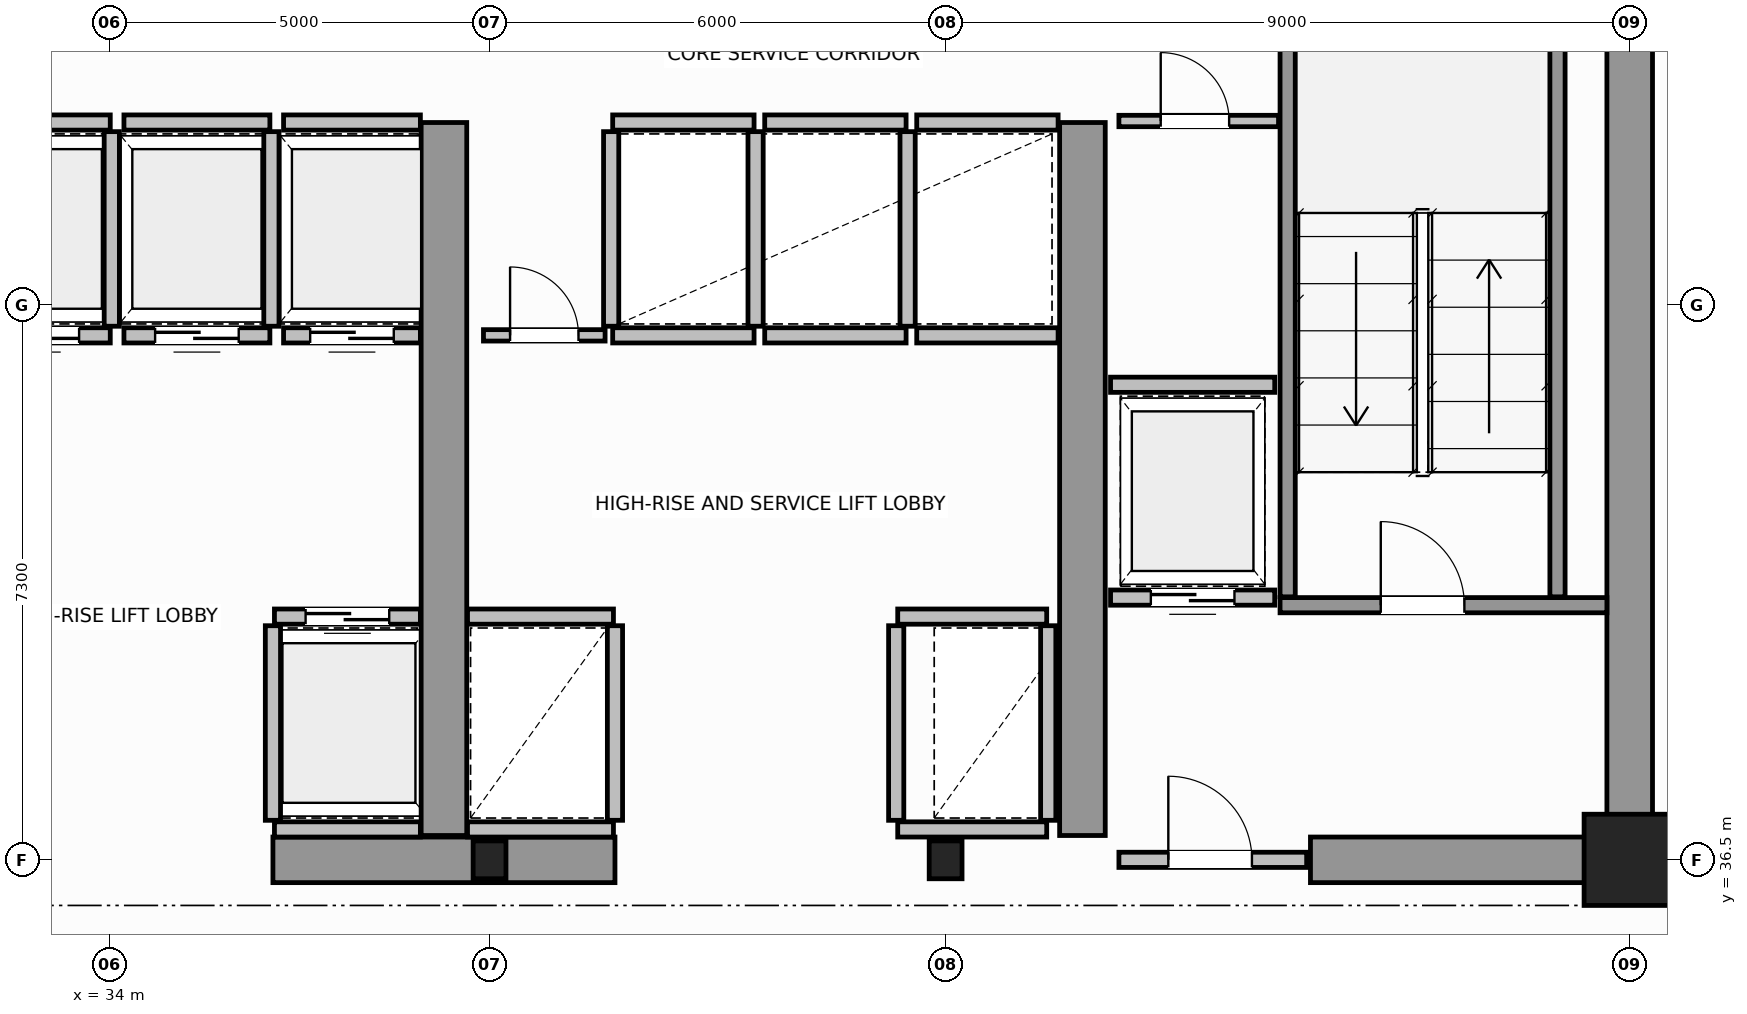
"""IFC4 building model, lengths in metres.
Left out: names, types, materials, properties, quantities, classifications, styles, units other than length and angle.
Written with IfcOpenShell. Run it as: python <this file> out.ifc"""

import sys

from ifc_helpers import new_model, si_unit, direction, frame, frame_2d, origin, origin_2d, place, context, subcontext, project, spatial, rectangle, i_section, extrude, source, transform, mapped, element, fill, save


model = new_model("IFC4")
c1 = context("Model", 3, precision=1e-05, world=origin(), true_north=direction((0.0, 1.0)))
c2 = subcontext(c1, "Body", "Model", "MODEL_VIEW")
j1 = project(units=[si_unit("LENGTHUNIT", "METRE"), si_unit("PLANEANGLEUNIT", "RADIAN")], contexts=[c1])
p1 = place(None, origin())
s1 = spatial("IfcSite", under=j1, at=p1, CompositionType="ELEMENT")
p2 = place(p1, origin())
s2 = spatial("IfcBuilding", under=s1, at=p2, CompositionType="ELEMENT")
p3 = place(p2, frame((0.0, 0.0, 188.0)))
s3 = spatial("IfcBuildingStorey", under=s2, at=p3, CompositionType="ELEMENT", Elevation=188.0)
m1 = source(origin(), c2, "Body", "SweptSolid", [
    extrude(i_section(OverallWidth=0.432, OverallDepth=0.498, WebThickness=0.055, FlangeThickness=0.068, FilletRadius=0.015, at=origin_2d()), origin(), (0.0, 0.0, 1.0), 3.8),
])
for number, where, z_axis, x_axis in (
    (1, (39.0, 36.5, 0.0), (0.0, 0.0, 1.0), (1.0, 0.0, 0.0)),
    (2, (45.0, 36.5, 0.0), (0.0, 0.0, 1.0), (1.0, 0.0, 0.0)),
):
    element("IfcColumn", number, at=place(p3, frame(where, z_axis=z_axis, x_axis=x_axis)), inside=s3, PredefinedType="COLUMN", context=c2, shape_type="MappedRepresentation", body=[
        mapped(m1, transform((0.0, 0.0, 0.0), scale=1.0)),
    ])
m2 = source(origin(), c2, "Body", "SweptSolid", [
    extrude(rectangle(XDim=1.2, YDim=1.2, at=origin_2d()), origin(), (0.0, 0.0, 1.0), 3.8),
])
p4 = place(p3, frame((54.0, 36.5, 0.0), z_axis=(0.0, 0.0, 1.0), x_axis=(1.0, 0.0, 0.0)))
e3 = element("IfcColumn", 3, at=p4, inside=s3, PredefinedType="COLUMN", context=c2, shape_type="MappedRepresentation", body=[
    mapped(m2, transform((0.0, 0.0, 0.0), scale=1.0)),
])
p5 = place(p3, frame((54.0, 36.5, 0.0), z_axis=(0.0, 0.0, 1.0), x_axis=(0.0, 1.0, 0.0)))
e4 = element("IfcWall", 4, at=p5, inside=s3, PredefinedType="SHEAR", context=c2, shape_type="SweptSolid", body=[
    extrude(rectangle(XDim=14.5, YDim=0.6, at=frame_2d((7.25, 0.0))), origin(), (0.0, 0.0, 1.0), 3.8),
])
p6 = place(p3, frame((36.15, 36.5, 0.0), z_axis=(0.0, 0.0, 1.0), x_axis=(1.0, 0.0, 0.0)))
e5 = element("IfcWall", 5, at=p6, inside=s3, PredefinedType="SHEAR", context=c2, shape_type="SweptSolid", body=[
    extrude(rectangle(XDim=4.5, YDim=0.6, at=frame_2d((2.25, 0.0))), origin(), (0.0, 0.0, 1.0), 3.8),
])
p7 = place(p3, frame((49.8, 36.5, 0.0), z_axis=(0.0, 0.0, 1.0), x_axis=(1.0, 0.0, 0.0)))
e6 = element("IfcWall", 6, at=p7, inside=s3, PredefinedType="SHEAR", context=c2, shape_type="SweptSolid", body=[
    extrude(rectangle(XDim=3.88, YDim=0.6, at=frame_2d((1.94, 0.0))), origin(), (0.0, 0.0, 1.0), 2.58),
])
for number, where, z_axis, x_axis in (
    (7, (38.4, 36.82, 0.0), (0.0, 0.0, 1.0), (0.0, 1.0, 0.0)),
    (8, (46.8, 36.82, 0.0), (0.0, 0.0, 1.0), (0.0, 1.0, 0.0)),
):
    element("IfcWall", number, at=place(p3, frame(where, z_axis=z_axis, x_axis=x_axis)), inside=s3, PredefinedType="SHEAR", context=c2, shape_type="SweptSolid", body=[
        extrude(rectangle(XDim=9.38, YDim=0.6, at=frame_2d((4.69, 0.0))), origin(), (0.0, 0.0, 1.0), 3.8),
    ])
p8 = place(p3, frame((49.4, 39.85, 0.0), z_axis=(0.0, 0.0, 1.0), x_axis=(1.0, 0.0, 0.0)))
e9 = element("IfcWall", 9, at=p8, inside=s3, PredefinedType="SOLIDWALL", context=c2, shape_type="SweptSolid", body=[
    extrude(rectangle(XDim=4.3, YDim=0.2, at=frame_2d((2.15, 0.0))), origin(), (0.0, 0.0, 1.0), 3.8),
])
p9 = place(p8, frame((1.325, 0.0, 0.0)))
e10 = element("IfcOpeningElement", 10, at=p9, cuts=e9, PredefinedType="OPENING", context=c2, shape_type="SweptSolid", body=[
    extrude(rectangle(XDim=1.1, YDim=2.15, at=frame_2d((0.55, 1.075))), frame((0.0, 0.11, 0.0), z_axis=(0.0, -1.0, 0.0), x_axis=(1.0, 0.0, 0.0)), (0.0, 0.0, 1.0), 0.22),
])
for number, where, z_axis, x_axis in (
    (11, (49.5, 39.96, 0.0), (0.0, 0.0, 1.0), (0.0, 1.0, 0.0)),
    (12, (53.05, 39.96, 0.0), (0.0, 0.0, 1.0), (0.0, 1.0, 0.0)),
):
    element("IfcWall", number, at=place(p3, frame(where, z_axis=z_axis, x_axis=x_axis)), inside=s3, PredefinedType="SOLIDWALL", context=c2, shape_type="SweptSolid", body=[
        extrude(rectangle(XDim=9.93, YDim=0.2, at=frame_2d((4.965, 0.0))), origin(), (0.0, 0.0, 1.0), 3.8),
    ])
p10 = place(p3, frame((47.28, 36.5, 0.0), z_axis=(0.0, 0.0, 1.0), x_axis=(1.0, 0.0, 0.0)))
e13 = element("IfcWall", 13, at=p10, inside=s3, PredefinedType="SOLIDWALL", context=c2, shape_type="SweptSolid", body=[
    extrude(rectangle(XDim=2.47, YDim=0.2, at=frame_2d((1.235, 0.0))), origin(), (0.0, 0.0, 1.0), 2.57),
])
p11 = place(p10, frame((0.65, 0.0, 0.0)))
e14 = element("IfcOpeningElement", 14, at=p11, cuts=e13, PredefinedType="OPENING", context=c2, shape_type="SweptSolid", body=[
    extrude(rectangle(XDim=1.1, YDim=2.15, at=frame_2d((0.55, 1.075))), frame((0.0, 0.11, 0.0), z_axis=(0.0, -1.0, 0.0), x_axis=(1.0, 0.0, 0.0)), (0.0, 0.0, 1.0), 0.22),
])
p12 = place(p3, frame((36.17, 39.7, 0.0), z_axis=(0.0, 0.0, 1.0), x_axis=(1.0, 0.0, 0.0)))
e15 = element("IfcWall", 15, at=p12, inside=s3, PredefinedType="SOLIDWALL", context=c2, shape_type="SweptSolid", body=[
    extrude(rectangle(XDim=1.92, YDim=0.2, at=frame_2d((0.96, 0.0))), origin(), (0.0, 0.0, 1.0), 3.58),
])
p13 = place(p12, frame((0.41, 0.0, 0.0)))
e16 = element("IfcOpeningElement", 16, at=p13, cuts=e15, PredefinedType="OPENING", context=c2, shape_type="SweptSolid", body=[
    extrude(rectangle(XDim=1.1, YDim=2.15, at=frame_2d((0.55, 1.075))), frame((0.0, 0.11, 0.0), z_axis=(0.0, -1.0, 0.0), x_axis=(1.0, 0.0, 0.0)), (0.0, 0.0, 1.0), 0.22),
])
p14 = place(p3, frame((36.17, 36.9, 0.0), z_axis=(0.0, 0.0, 1.0), x_axis=(1.0, 0.0, 0.0)))
e17 = element("IfcWall", 17, at=p14, inside=s3, PredefinedType="SOLIDWALL", context=c2, shape_type="SweptSolid", body=[
    extrude(rectangle(XDim=1.92, YDim=0.2, at=frame_2d((0.96, 0.0))), origin(), (0.0, 0.0, 1.0), 3.58),
])
p15 = place(p3, frame((36.15, 37.02, 0.0), z_axis=(0.0, 0.0, 1.0), x_axis=(0.0, 1.0, 0.0)))
e18 = element("IfcWall", 18, at=p15, inside=s3, PredefinedType="SOLIDWALL", context=c2, shape_type="SweptSolid", body=[
    extrude(rectangle(XDim=2.56, YDim=0.2, at=frame_2d((1.28, 0.0))), origin(), (0.0, 0.0, 1.0), 3.58),
])
p16 = place(p3, frame((32.09, 43.4, 0.0), z_axis=(0.0, 0.0, 1.0), x_axis=(1.0, 0.0, 0.0)))
e19 = element("IfcWall", 19, at=p16, inside=s3, PredefinedType="SOLIDWALL", context=c2, shape_type="SweptSolid", body=[
    extrude(rectangle(XDim=1.92, YDim=0.2, at=frame_2d((0.96, 0.0))), origin(), (0.0, 0.0, 1.0), 3.58),
])
p17 = place(p16, frame((0.41, 0.0, 0.0)))
e20 = element("IfcOpeningElement", 20, at=p17, cuts=e19, PredefinedType="OPENING", context=c2, shape_type="SweptSolid", body=[
    extrude(rectangle(XDim=1.1, YDim=2.15, at=frame_2d((0.55, 1.075))), frame((0.0, 0.11, 0.0), z_axis=(0.0, -1.0, 0.0), x_axis=(1.0, 0.0, 0.0)), (0.0, 0.0, 1.0), 0.22),
])
p18 = place(p3, frame((32.09, 46.2, 0.0), z_axis=(0.0, 0.0, 1.0), x_axis=(1.0, 0.0, 0.0)))
e21 = element("IfcWall", 21, at=p18, inside=s3, PredefinedType="SOLIDWALL", context=c2, shape_type="SweptSolid", body=[
    extrude(rectangle(XDim=1.92, YDim=0.2, at=frame_2d((0.96, 0.0))), origin(), (0.0, 0.0, 1.0), 3.58),
])
p19 = place(p3, frame((34.03, 43.52, 0.0), z_axis=(0.0, 0.0, 1.0), x_axis=(0.0, 1.0, 0.0)))
e22 = element("IfcWall", 22, at=p19, inside=s3, PredefinedType="SOLIDWALL", context=c2, shape_type="SweptSolid", body=[
    extrude(rectangle(XDim=2.56, YDim=0.2, at=frame_2d((1.28, 0.0))), origin(), (0.0, 0.0, 1.0), 3.58),
])
p20 = place(p3, frame((34.19, 43.4, 0.0), z_axis=(0.0, 0.0, 1.0), x_axis=(1.0, 0.0, 0.0)))
e23 = element("IfcWall", 23, at=p20, inside=s3, PredefinedType="SOLIDWALL", context=c2, shape_type="SweptSolid", body=[
    extrude(rectangle(XDim=1.92, YDim=0.2, at=frame_2d((0.96, 0.0))), origin(), (0.0, 0.0, 1.0), 3.58),
])
p21 = place(p20, frame((0.41, 0.0, 0.0)))
e24 = element("IfcOpeningElement", 24, at=p21, cuts=e23, PredefinedType="OPENING", context=c2, shape_type="SweptSolid", body=[
    extrude(rectangle(XDim=1.1, YDim=2.15, at=frame_2d((0.55, 1.075))), frame((0.0, 0.11, 0.0), z_axis=(0.0, -1.0, 0.0), x_axis=(1.0, 0.0, 0.0)), (0.0, 0.0, 1.0), 0.22),
])
p22 = place(p3, frame((34.19, 46.2, 0.0), z_axis=(0.0, 0.0, 1.0), x_axis=(1.0, 0.0, 0.0)))
e25 = element("IfcWall", 25, at=p22, inside=s3, PredefinedType="SOLIDWALL", context=c2, shape_type="SweptSolid", body=[
    extrude(rectangle(XDim=1.92, YDim=0.2, at=frame_2d((0.96, 0.0))), origin(), (0.0, 0.0, 1.0), 3.58),
])
p23 = place(p3, frame((36.13, 43.52, 0.0), z_axis=(0.0, 0.0, 1.0), x_axis=(0.0, 1.0, 0.0)))
e26 = element("IfcWall", 26, at=p23, inside=s3, PredefinedType="SOLIDWALL", context=c2, shape_type="SweptSolid", body=[
    extrude(rectangle(XDim=2.56, YDim=0.2, at=frame_2d((1.28, 0.0))), origin(), (0.0, 0.0, 1.0), 3.58),
])
p24 = place(p3, frame((36.29, 43.4, 0.0), z_axis=(0.0, 0.0, 1.0), x_axis=(1.0, 0.0, 0.0)))
e27 = element("IfcWall", 27, at=p24, inside=s3, PredefinedType="SOLIDWALL", context=c2, shape_type="SweptSolid", body=[
    extrude(rectangle(XDim=1.8, YDim=0.2, at=frame_2d((0.9, 0.0))), origin(), (0.0, 0.0, 1.0), 3.58),
])
p25 = place(p24, frame((0.35, 0.0, 0.0)))
e28 = element("IfcOpeningElement", 28, at=p25, cuts=e27, PredefinedType="OPENING", context=c2, shape_type="SweptSolid", body=[
    extrude(rectangle(XDim=1.1, YDim=2.15, at=frame_2d((0.55, 1.075))), frame((0.0, 0.11, 0.0), z_axis=(0.0, -1.0, 0.0), x_axis=(1.0, 0.0, 0.0)), (0.0, 0.0, 1.0), 0.22),
])
p26 = place(p3, frame((36.29, 46.2, 0.0), z_axis=(0.0, 0.0, 1.0), x_axis=(1.0, 0.0, 0.0)))
e29 = element("IfcWall", 29, at=p26, inside=s3, PredefinedType="SOLIDWALL", context=c2, shape_type="SweptSolid", body=[
    extrude(rectangle(XDim=1.8, YDim=0.2, at=frame_2d((0.9, 0.0))), origin(), (0.0, 0.0, 1.0), 3.58),
])
for number, where, z_axis, x_axis in (
    (30, (38.71, 39.7, 0.0), (0.0, 0.0, 1.0), (1.0, 0.0, 0.0)),
    (31, (38.71, 36.9, 0.0), (0.0, 0.0, 1.0), (1.0, 0.0, 0.0)),
):
    element("IfcWall", number, at=place(p3, frame(where, z_axis=z_axis, x_axis=x_axis)), inside=s3, PredefinedType="SOLIDWALL", context=c2, shape_type="SweptSolid", body=[
        extrude(rectangle(XDim=1.92, YDim=0.2, at=frame_2d((0.96, 0.0))), origin(), (0.0, 0.0, 1.0), 3.58),
    ])
p27 = place(p3, frame((40.65, 37.02, 0.0), z_axis=(0.0, 0.0, 1.0), x_axis=(0.0, 1.0, 0.0)))
e32 = element("IfcWall", 32, at=p27, inside=s3, PredefinedType="SOLIDWALL", context=c2, shape_type="SweptSolid", body=[
    extrude(rectangle(XDim=2.56, YDim=0.2, at=frame_2d((1.28, 0.0))), origin(), (0.0, 0.0, 1.0), 3.58),
])
p28 = place(p3, frame((44.37, 39.7, 0.0), z_axis=(0.0, 0.0, 1.0), x_axis=(1.0, 0.0, 0.0)))
e33 = element("IfcWall", 33, at=p28, inside=s3, PredefinedType="SOLIDWALL", context=c2, shape_type="SweptSolid", body=[
    extrude(rectangle(XDim=1.96, YDim=0.2, at=frame_2d((0.98, 0.0))), origin(), (0.0, 0.0, 1.0), 3.58),
])
p29 = place(p3, frame((44.37, 36.9, 0.0), z_axis=(0.0, 0.0, 1.0), x_axis=(1.0, 0.0, 0.0)))
e34 = element("IfcWall", 34, at=p29, inside=s3, PredefinedType="SOLIDWALL", context=c2, shape_type="SweptSolid", body=[
    extrude(rectangle(XDim=1.96, YDim=0.2, at=frame_2d((0.98, 0.0))), origin(), (0.0, 0.0, 1.0), 2.57),
])
for number, where, z_axis, x_axis in (
    (35, (44.35, 37.02, 0.0), (0.0, 0.0, 1.0), (0.0, 1.0, 0.0)),
    (36, (46.35, 37.02, 0.0), (0.0, 0.0, 1.0), (0.0, 1.0, 0.0)),
):
    element("IfcWall", number, at=place(p3, frame(where, z_axis=z_axis, x_axis=x_axis)), inside=s3, PredefinedType="SOLIDWALL", context=c2, shape_type="SweptSolid", body=[
        extrude(rectangle(XDim=2.56, YDim=0.2, at=frame_2d((1.28, 0.0))), origin(), (0.0, 0.0, 1.0), 3.58),
    ])
for number, where, z_axis, x_axis in (
    (37, (40.62, 43.4, 0.0), (0.0, 0.0, 1.0), (1.0, 0.0, 0.0)),
    (38, (40.62, 46.2, 0.0), (0.0, 0.0, 1.0), (1.0, 0.0, 0.0)),
):
    element("IfcWall", number, at=place(p3, frame(where, z_axis=z_axis, x_axis=x_axis)), inside=s3, PredefinedType="SOLIDWALL", context=c2, shape_type="SweptSolid", body=[
        extrude(rectangle(XDim=1.86, YDim=0.2, at=frame_2d((0.93, 0.0))), origin(), (0.0, 0.0, 1.0), 3.58),
    ])
for number, where, z_axis, x_axis in (
    (39, (40.6, 43.52, 0.0), (0.0, 0.0, 1.0), (0.0, 1.0, 0.0)),
    (40, (42.5, 43.52, 0.0), (0.0, 0.0, 1.0), (0.0, 1.0, 0.0)),
):
    element("IfcWall", number, at=place(p3, frame(where, z_axis=z_axis, x_axis=x_axis)), inside=s3, PredefinedType="SOLIDWALL", context=c2, shape_type="SweptSolid", body=[
        extrude(rectangle(XDim=2.56, YDim=0.2, at=frame_2d((1.28, 0.0))), origin(), (0.0, 0.0, 1.0), 3.58),
    ])
for number, where, z_axis, x_axis in (
    (41, (42.62, 43.4, 0.0), (0.0, 0.0, 1.0), (1.0, 0.0, 0.0)),
    (42, (42.62, 46.2, 0.0), (0.0, 0.0, 1.0), (1.0, 0.0, 0.0)),
):
    element("IfcWall", number, at=place(p3, frame(where, z_axis=z_axis, x_axis=x_axis)), inside=s3, PredefinedType="SOLIDWALL", context=c2, shape_type="SweptSolid", body=[
        extrude(rectangle(XDim=1.86, YDim=0.2, at=frame_2d((0.93, 0.0))), origin(), (0.0, 0.0, 1.0), 3.58),
    ])
p30 = place(p3, frame((44.5, 43.52, 0.0), z_axis=(0.0, 0.0, 1.0), x_axis=(0.0, 1.0, 0.0)))
e43 = element("IfcWall", 43, at=p30, inside=s3, PredefinedType="SOLIDWALL", context=c2, shape_type="SweptSolid", body=[
    extrude(rectangle(XDim=2.56, YDim=0.2, at=frame_2d((1.28, 0.0))), origin(), (0.0, 0.0, 1.0), 3.58),
])
for number, where, z_axis, x_axis in (
    (44, (44.62, 43.4, 0.0), (0.0, 0.0, 1.0), (1.0, 0.0, 0.0)),
    (45, (44.62, 46.2, 0.0), (0.0, 0.0, 1.0), (1.0, 0.0, 0.0)),
):
    element("IfcWall", number, at=place(p3, frame(where, z_axis=z_axis, x_axis=x_axis)), inside=s3, PredefinedType="SOLIDWALL", context=c2, shape_type="SweptSolid", body=[
        extrude(rectangle(XDim=1.86, YDim=0.2, at=frame_2d((0.93, 0.0))), origin(), (0.0, 0.0, 1.0), 3.58),
    ])
p31 = place(p3, frame((47.17, 39.95, 0.0), z_axis=(0.0, 0.0, 1.0), x_axis=(1.0, 0.0, 0.0)))
e46 = element("IfcWall", 46, at=p31, inside=s3, PredefinedType="SOLIDWALL", context=c2, shape_type="SweptSolid", body=[
    extrude(rectangle(XDim=2.16, YDim=0.2, at=frame_2d((1.08, 0.0))), origin(), (0.0, 0.0, 1.0), 3.58),
])
p32 = place(p31, frame((0.53, 0.0, 0.0)))
e47 = element("IfcOpeningElement", 47, at=p32, cuts=e46, PredefinedType="OPENING", context=c2, shape_type="SweptSolid", body=[
    extrude(rectangle(XDim=1.1, YDim=2.15, at=frame_2d((0.55, 1.075))), frame((0.0, 0.11, 0.0), z_axis=(0.0, -1.0, 0.0), x_axis=(1.0, 0.0, 0.0)), (0.0, 0.0, 1.0), 0.22),
])
p33 = place(p3, frame((47.17, 42.75, 0.0), z_axis=(0.0, 0.0, 1.0), x_axis=(1.0, 0.0, 0.0)))
e48 = element("IfcWall", 48, at=p33, inside=s3, PredefinedType="SOLIDWALL", context=c2, shape_type="SweptSolid", body=[
    extrude(rectangle(XDim=2.16, YDim=0.2, at=frame_2d((1.08, 0.0))), origin(), (0.0, 0.0, 1.0), 3.58),
])
p34 = place(p3, frame((47.28, 46.22, 0.0), z_axis=(0.0, 0.0, 1.0), x_axis=(1.0, 0.0, 0.0)))
e49 = element("IfcWall", 49, at=p34, inside=s3, PredefinedType="PARTITIONING", context=c2, shape_type="SweptSolid", body=[
    extrude(rectangle(XDim=2.1, YDim=0.15, at=frame_2d((1.05, 0.0))), origin(), (0.0, 0.0, 1.0), 3.58),
])
p35 = place(p34, frame((0.55, 0.0, 0.0)))
e50 = element("IfcOpeningElement", 50, at=p35, cuts=e49, PredefinedType="OPENING", context=c2, shape_type="SweptSolid", body=[
    extrude(rectangle(XDim=0.9, YDim=2.1, at=frame_2d((0.45, 1.05))), frame((0.0, 0.085, 0.0), z_axis=(0.0, -1.0, 0.0), x_axis=(1.0, 0.0, 0.0)), (0.0, 0.0, 1.0), 0.17),
])
p36 = place(p3, frame((38.92, 43.4, 0.0), z_axis=(0.0, 0.0, 1.0), x_axis=(1.0, 0.0, 0.0)))
e51 = element("IfcWall", 51, at=p36, inside=s3, PredefinedType="PARTITIONING", context=c2, shape_type="SweptSolid", body=[
    extrude(rectangle(XDim=1.6, YDim=0.15, at=frame_2d((0.8, 0.0))), origin(), (0.0, 0.0, 1.0), 3.58),
])
p37 = place(p36, frame((0.35, 0.0, 0.0)))
e52 = element("IfcOpeningElement", 52, at=p37, cuts=e51, PredefinedType="OPENING", context=c2, shape_type="SweptSolid", body=[
    extrude(rectangle(XDim=0.9, YDim=2.1, at=frame_2d((0.45, 1.05))), frame((0.0, 0.085, 0.0), z_axis=(0.0, -1.0, 0.0), x_axis=(1.0, 0.0, 0.0)), (0.0, 0.0, 1.0), 0.17),
])
p38 = place(p3, frame((54.06, 36.48, 0.0), z_axis=(0.0, 0.0, 1.0), x_axis=(1.0, 0.0, 0.0)))
e53 = element("IfcWall", 53, at=p38, inside=s3, PredefinedType="PARTITIONING", context=c2, shape_type="SweptSolid", body=[
    extrude(rectangle(XDim=6.651, YDim=0.12, at=frame_2d((3.325, 0.0))), origin(), (0.0, 0.0, 1.0), 2.97),
])
p39 = place(p38, frame((2.875, 0.0, 0.0)))
e54 = element("IfcOpeningElement", 54, at=p39, cuts=e53, PredefinedType="OPENING", context=c2, shape_type="SweptSolid", body=[
    extrude(rectangle(XDim=0.9, YDim=2.15, at=frame_2d((0.45, 1.075))), frame((0.0, 0.07, 0.0), z_axis=(0.0, -1.0, 0.0), x_axis=(1.0, 0.0, 0.0)), (0.0, 0.0, 1.0), 0.14),
])
m3 = source(origin(), c2, "Body", "SweptSolid", [
    extrude(rectangle(XDim=1.1, YDim=2.15, at=frame_2d((0.55, 1.075))), frame((0.0, 0.025, 0.0), z_axis=(0.0, -1.0, 0.0), x_axis=(1.0, 0.0, 0.0)), (0.0, 0.0, 1.0), 0.05),
])
p40 = place(p9, origin())
e55 = element("IfcDoor", 55, at=p40, inside=s3, OperationType="SINGLE_SWING_RIGHT", PredefinedType="DOOR", context=c2, shape_type="MappedRepresentation", body=[
    mapped(m3, transform((0.0, 0.0, 0.0), scale=1.0)),
])
fill(e10, e55)
p41 = place(p11, origin())
e56 = element("IfcDoor", 56, at=p41, inside=s3, OperationType="SINGLE_SWING_LEFT", PredefinedType="DOOR", context=c2, shape_type="MappedRepresentation", body=[
    mapped(m3, transform((0.0, 0.0, 0.0), scale=1.0)),
])
fill(e14, e56)
p42 = place(p13, origin())
e57 = element("IfcDoor", 57, at=p42, inside=s3, OperationType="DOUBLE_DOOR_SLIDING", PredefinedType="DOOR", context=c2, shape_type="MappedRepresentation", body=[
    mapped(m3, transform((0.0, 0.0, 0.0), scale=1.0)),
])
fill(e16, e57)
p43 = place(p17, origin())
e58 = element("IfcDoor", 58, at=p43, inside=s3, OperationType="DOUBLE_DOOR_SLIDING", PredefinedType="DOOR", context=c2, shape_type="MappedRepresentation", body=[
    mapped(m3, transform((0.0, 0.0, 0.0), scale=1.0)),
])
fill(e20, e58)
p44 = place(p21, origin())
e59 = element("IfcDoor", 59, at=p44, inside=s3, OperationType="DOUBLE_DOOR_SLIDING", PredefinedType="DOOR", context=c2, shape_type="MappedRepresentation", body=[
    mapped(m3, transform((0.0, 0.0, 0.0), scale=1.0)),
])
fill(e24, e59)
p45 = place(p25, origin())
e60 = element("IfcDoor", 60, at=p45, inside=s3, OperationType="DOUBLE_DOOR_SLIDING", PredefinedType="DOOR", context=c2, shape_type="MappedRepresentation", body=[
    mapped(m3, transform((0.0, 0.0, 0.0), scale=1.0)),
])
fill(e28, e60)
p46 = place(p32, origin())
e61 = element("IfcDoor", 61, at=p46, inside=s3, OperationType="DOUBLE_DOOR_SLIDING", PredefinedType="DOOR", context=c2, shape_type="MappedRepresentation", body=[
    mapped(m3, transform((0.0, 0.0, 0.0), scale=1.0)),
])
fill(e47, e61)
m4 = source(origin(), c2, "Body", "SweptSolid", [
    extrude(rectangle(XDim=0.9, YDim=2.1, at=frame_2d((0.45, 1.05))), frame((0.0, 0.025, 0.0), z_axis=(0.0, -1.0, 0.0), x_axis=(1.0, 0.0, 0.0)), (0.0, 0.0, 1.0), 0.05),
])
p47 = place(p35, origin())
e62 = element("IfcDoor", 62, at=p47, inside=s3, OperationType="SINGLE_SWING_RIGHT", PredefinedType="DOOR", context=c2, shape_type="MappedRepresentation", body=[
    mapped(m4, transform((0.0, 0.0, 0.0), scale=1.0)),
])
fill(e50, e62)
p48 = place(p37, origin())
e63 = element("IfcDoor", 63, at=p48, inside=s3, OperationType="SINGLE_SWING_LEFT", PredefinedType="DOOR", context=c2, shape_type="MappedRepresentation", body=[
    mapped(m4, transform((0.0, 0.0, 0.0), scale=1.0)),
])
fill(e52, e63)
save(model, sys.argv[1])
